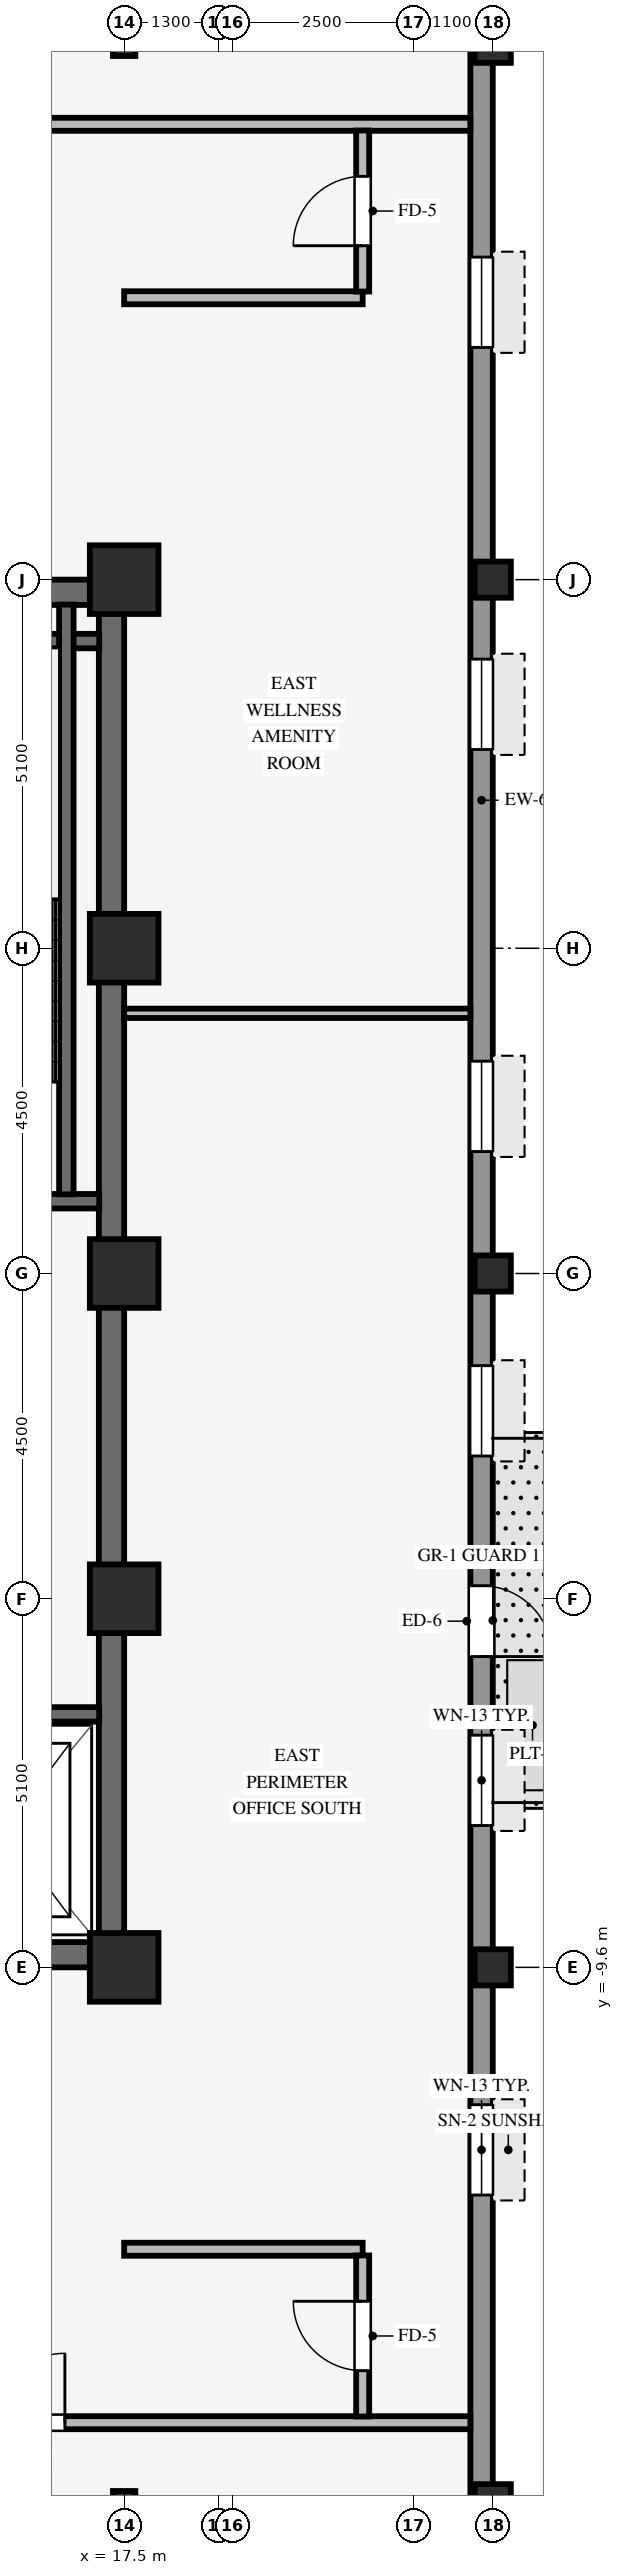
"""IFC4 building model, lengths in metres.
Left out: names, types, materials, properties, quantities, classifications, styles, units other than length and angle.
Written with IfcOpenShell. Run it as: python <this file> out.ifc"""

import sys

from ifc_helpers import new_model, si_unit, direction, frame, frame_2d, origin, origin_2d, place, context, subcontext, project, spatial, rectangle, hollow_rectangle, i_section, extrude, source, transform, mapped, element, fill, save


model = new_model("IFC4")
c1 = context("Model", 3, precision=1e-05, world=origin(), true_north=direction((0.0, 1.0)))
c2 = subcontext(c1, "Body", "Model", "MODEL_VIEW")
j1 = project(units=[si_unit("LENGTHUNIT", "METRE"), si_unit("PLANEANGLEUNIT", "RADIAN")], contexts=[c1])
p1 = place(None, origin())
s1 = spatial("IfcSite", under=j1, at=p1, CompositionType="ELEMENT")
p2 = place(p1, origin())
s2 = spatial("IfcBuilding", under=s1, at=p2, CompositionType="ELEMENT")
p3 = place(p2, frame((0.0, 0.0, 198.2)))
s3 = spatial("IfcBuildingStorey", under=s2, at=p3, CompositionType="ELEMENT", Elevation=198.2)
for number, where, z_axis, x_axis in (
    (1, (9.0, -9.425, 0.0), (0.0, 0.0, 1.0), (1.0, 0.0, 0.0)),
    (2, (9.0, 9.425, 0.0), (0.0, 0.0, 1.0), (1.0, 0.0, 0.0)),
):
    element("IfcWall", number, at=place(p3, frame(where, z_axis=z_axis, x_axis=x_axis)), inside=s3, PredefinedType="SHEAR", context=c2, shape_type="SweptSolid", body=[
        extrude(rectangle(XDim=8.5, YDim=0.35, at=frame_2d((4.25, 0.0))), origin(), (0.0, 0.0, 1.0), 3.37),
    ])
p4 = place(p3, frame((17.325, -9.255, 0.0), z_axis=(0.0, 0.0, 1.0), x_axis=(0.0, 1.0, 0.0)))
e3 = element("IfcWall", 3, at=p4, inside=s3, PredefinedType="SHEAR", context=c2, shape_type="SweptSolid", body=[
    extrude(rectangle(XDim=18.51, YDim=0.35, at=frame_2d((9.255, 0.0))), origin(), (0.0, 0.0, 1.0), 3.37),
])
for number, where, z_axis, x_axis in (
    (4, (17.5, -9.6, 0.0), (0.0, 0.0, 1.0), (1.0, 0.0, 0.0)),
    (5, (17.5, -4.5, 0.0), (0.0, 0.0, 1.0), (1.0, 0.0, 0.0)),
    (6, (17.5, 4.5, 0.0), (0.0, 0.0, 1.0), (1.0, 0.0, 0.0)),
    (7, (17.5, 9.6, 0.0), (0.0, 0.0, 1.0), (1.0, 0.0, 0.0)),
    (8, (17.5, 0.0, 0.0), (0.0, 0.0, 1.0), (1.0, 0.0, 0.0)),
):
    element("IfcColumn", number, at=place(p3, frame(where, z_axis=z_axis, x_axis=x_axis)), inside=s3, PredefinedType="COLUMN", context=c2, shape_type="SweptSolid", body=[
        extrude(rectangle(XDim=0.95, YDim=0.95, at=origin_2d()), origin(), (0.0, 0.0, 1.0), 3.37),
    ])
for number, where, z_axis, x_axis in (
    (9, (22.6, -17.0, 0.0), (0.0, 0.0, 1.0), (1.0, 0.0, 0.0)),
    (10, (22.6, -9.6, 0.0), (0.0, 0.0, 1.0), (1.0, 0.0, 0.0)),
    (11, (22.6, 0.0, 0.0), (0.0, 0.0, 1.0), (1.0, 0.0, 0.0)),
    (12, (22.6, 9.6, 0.0), (0.0, 0.0, 1.0), (1.0, 0.0, 0.0)),
    (13, (22.6, 17.0, 0.0), (0.0, 0.0, 1.0), (1.0, 0.0, 0.0)),
):
    element("IfcColumn", number, at=place(p3, frame(where, z_axis=z_axis, x_axis=x_axis)), inside=s3, PredefinedType="COLUMN", context=c2, shape_type="SweptSolid", body=[
        extrude(hollow_rectangle(XDim=0.5, YDim=0.5, WallThickness=0.032, InnerFilletRadius=0.032, OuterFilletRadius=0.064, at=origin_2d()), origin(), (0.0, 0.0, 1.0), 3.37),
    ])
for number, where, z_axis, x_axis in (
    (14, (17.5, -17.0, 0.0), (0.0, 0.0, 1.0), (1.0, 0.0, 0.0)),
    (15, (17.5, 17.0, 0.0), (0.0, 0.0, 1.0), (1.0, 0.0, 0.0)),
):
    element("IfcColumn", number, at=place(p3, frame(where, z_axis=z_axis, x_axis=x_axis)), inside=s3, PredefinedType="COLUMN", context=c2, shape_type="SweptSolid", body=[
        extrude(i_section(OverallWidth=0.31, OverallDepth=0.31, WebThickness=0.015, FlangeThickness=0.015, FilletRadius=0.015, at=origin_2d()), origin(), (0.0, 0.0, 1.0), 3.37),
    ])
p5 = place(p3, frame((22.445, -20.794, 0.0), z_axis=(0.0, 0.0, 1.0), x_axis=(0.0, 1.0, 0.0)))
e16 = element("IfcWall", 16, at=p5, inside=s3, PredefinedType="STANDARD", context=c2, shape_type="SweptSolid", body=[
    extrude(rectangle(XDim=37.788, YDim=0.31, at=frame_2d((18.894, 0.0))), origin(), (0.0, 0.0, 1.0), 2.705),
])
p6 = place(p5, frame((16.474, 0.0, 0.0), z_axis=(0.0, 0.0, 1.0), x_axis=(-1.0, 0.0, 0.0)))
e17 = element("IfcOpeningElement", 17, at=p6, cuts=e16, PredefinedType="OPENING", context=c2, shape_type="SweptSolid", body=[
    extrude(rectangle(XDim=0.98, YDim=2.15, at=frame_2d((0.49, 1.075))), frame((0.0, 0.165, 0.0), z_axis=(0.0, -1.0, 0.0), x_axis=(1.0, 0.0, 0.0)), (0.0, 0.0, 1.0), 0.33),
])
p7 = place(p5, frame((1.581, 0.0, 0.8)))
e18 = element("IfcOpeningElement", 18, at=p7, cuts=e16, PredefinedType="OPENING", context=c2, shape_type="SweptSolid", body=[
    extrude(rectangle(XDim=1.25, YDim=1.52, at=frame_2d((0.625, 0.76))), frame((0.0, 0.165, 0.0), z_axis=(0.0, -1.0, 0.0), x_axis=(1.0, 0.0, 0.0)), (0.0, 0.0, 1.0), 0.33),
])
p8 = place(p5, frame((8.044, 0.0, 0.8)))
e19 = element("IfcOpeningElement", 19, at=p8, cuts=e16, PredefinedType="OPENING", context=c2, shape_type="SweptSolid", body=[
    extrude(rectangle(XDim=1.25, YDim=1.52, at=frame_2d((0.625, 0.76))), frame((0.0, 0.165, 0.0), z_axis=(0.0, -1.0, 0.0), x_axis=(1.0, 0.0, 0.0)), (0.0, 0.0, 1.0), 0.33),
])
p9 = place(p5, frame((13.156, 0.0, 0.8)))
e20 = element("IfcOpeningElement", 20, at=p9, cuts=e16, PredefinedType="OPENING", context=c2, shape_type="SweptSolid", body=[
    extrude(rectangle(XDim=1.25, YDim=1.52, at=frame_2d((0.625, 0.76))), frame((0.0, 0.165, 0.0), z_axis=(0.0, -1.0, 0.0), x_axis=(1.0, 0.0, 0.0)), (0.0, 0.0, 1.0), 0.33),
])
p10 = place(p5, frame((18.269, 0.0, 0.8)))
e21 = element("IfcOpeningElement", 21, at=p10, cuts=e16, PredefinedType="OPENING", context=c2, shape_type="SweptSolid", body=[
    extrude(rectangle(XDim=1.25, YDim=1.52, at=frame_2d((0.625, 0.76))), frame((0.0, 0.165, 0.0), z_axis=(0.0, -1.0, 0.0), x_axis=(1.0, 0.0, 0.0)), (0.0, 0.0, 1.0), 0.33),
])
p11 = place(p5, frame((22.482, 0.0, 0.8)))
e22 = element("IfcOpeningElement", 22, at=p11, cuts=e16, PredefinedType="OPENING", context=c2, shape_type="SweptSolid", body=[
    extrude(rectangle(XDim=1.25, YDim=1.52, at=frame_2d((0.625, 0.76))), frame((0.0, 0.165, 0.0), z_axis=(0.0, -1.0, 0.0), x_axis=(1.0, 0.0, 0.0)), (0.0, 0.0, 1.0), 0.33),
])
p12 = place(p5, frame((28.044, 0.0, 0.8)))
e23 = element("IfcOpeningElement", 23, at=p12, cuts=e16, PredefinedType="OPENING", context=c2, shape_type="SweptSolid", body=[
    extrude(rectangle(XDim=1.25, YDim=1.52, at=frame_2d((0.625, 0.76))), frame((0.0, 0.165, 0.0), z_axis=(0.0, -1.0, 0.0), x_axis=(1.0, 0.0, 0.0)), (0.0, 0.0, 1.0), 0.33),
])
p13 = place(p5, frame((33.607, 0.0, 0.8)))
e24 = element("IfcOpeningElement", 24, at=p13, cuts=e16, PredefinedType="OPENING", context=c2, shape_type="SweptSolid", body=[
    extrude(rectangle(XDim=1.25, YDim=1.52, at=frame_2d((0.625, 0.76))), frame((0.0, 0.165, 0.0), z_axis=(0.0, -1.0, 0.0), x_axis=(1.0, 0.0, 0.0)), (0.0, 0.0, 1.0), 0.33),
])
for number, where, z_axis, x_axis in (
    (25, (13.535, 1.0, 0.0), (0.0, 0.0, 1.0), (1.0, 0.0, 0.0)),
    (26, (13.535, 8.75, 0.0), (0.0, 0.0, 1.0), (1.0, 0.0, 0.0)),
):
    element("IfcWall", number, at=place(p3, frame(where, z_axis=z_axis, x_axis=x_axis)), inside=s3, PredefinedType="SHEAR", context=c2, shape_type="SweptSolid", body=[
        extrude(rectangle(XDim=3.62, YDim=0.2, at=frame_2d((1.81, 0.0))), origin(), (0.0, 0.0, 1.0), 3.37),
    ])
p14 = place(p3, frame((16.7, 1.095, 0.0), z_axis=(0.0, 0.0, 1.0), x_axis=(0.0, 1.0, 0.0)))
e27 = element("IfcWall", 27, at=p14, inside=s3, PredefinedType="SHEAR", context=c2, shape_type="SweptSolid", body=[
    extrude(rectangle(XDim=8.16, YDim=0.2, at=frame_2d((4.08, 0.0))), origin(), (0.0, 0.0, 1.0), 3.37),
])
p15 = place(p3, frame((14.645, -6.1, 0.0), z_axis=(0.0, 0.0, 1.0), x_axis=(1.0, 0.0, 0.0)))
e28 = element("IfcWall", 28, at=p15, inside=s3, PredefinedType="SHEAR", context=c2, shape_type="SweptSolid", body=[
    extrude(rectangle(XDim=2.51, YDim=0.2, at=frame_2d((1.255, 0.0))), origin(), (0.0, 0.0, 1.0), 3.37),
])
p16 = place(p3, frame((-26.09, -15.9, 0.0), z_axis=(0.0, 0.0, 1.0), x_axis=(1.0, 0.0, 0.0)))
e29 = element("IfcWall", 29, at=p16, inside=s3, PredefinedType="PARTITIONING", context=c2, shape_type="SweptSolid", body=[
    extrude(rectangle(XDim=48.38, YDim=0.18, at=frame_2d((24.19, 0.0))), origin(), (0.0, 0.0, 1.0), 3.36),
])
p17 = place(p16, frame((41.81, 0.0, 0.0)))
e30 = element("IfcOpeningElement", 30, at=p17, cuts=e29, PredefinedType="OPENING", context=c2, shape_type="SweptSolid", body=[
    extrude(rectangle(XDim=0.96, YDim=2.1, at=frame_2d((0.48, 1.05))), frame((0.0, 0.1, 0.0), z_axis=(0.0, -1.0, 0.0), x_axis=(1.0, 0.0, 0.0)), (0.0, 0.0, 1.0), 0.2),
])
p18 = place(p16, frame((17.985, 0.0, 0.0)))
e31 = element("IfcOpeningElement", 31, at=p18, cuts=e29, PredefinedType="OPENING", context=c2, shape_type="SweptSolid", body=[
    extrude(rectangle(XDim=0.96, YDim=2.1, at=frame_2d((0.48, 1.05))), frame((0.0, 0.1, 0.0), z_axis=(0.0, -1.0, 0.0), x_axis=(1.0, 0.0, 0.0)), (0.0, 0.0, 1.0), 0.2),
])
p19 = place(p16, frame((26.55, 0.0, 0.0)))
e32 = element("IfcOpeningElement", 32, at=p19, cuts=e29, PredefinedType="OPENING", context=c2, shape_type="SweptSolid", body=[
    extrude(rectangle(XDim=0.96, YDim=2.1, at=frame_2d((0.48, 1.05))), frame((0.0, 0.1, 0.0), z_axis=(0.0, -1.0, 0.0), x_axis=(1.0, 0.0, 0.0)), (0.0, 0.0, 1.0), 0.2),
])
p20 = place(p16, frame((10.935, 0.0, 0.0)))
e33 = element("IfcOpeningElement", 33, at=p20, cuts=e29, PredefinedType="OPENING", context=c2, shape_type="SweptSolid", body=[
    extrude(rectangle(XDim=0.96, YDim=2.1, at=frame_2d((0.48, 1.05))), frame((0.0, 0.1, 0.0), z_axis=(0.0, -1.0, 0.0), x_axis=(1.0, 0.0, 0.0)), (0.0, 0.0, 1.0), 0.2),
])
p21 = place(p16, frame((35.91, 0.0, 0.0)))
e34 = element("IfcOpeningElement", 34, at=p21, cuts=e29, PredefinedType="OPENING", context=c2, shape_type="SweptSolid", body=[
    extrude(rectangle(XDim=0.96, YDim=2.1, at=frame_2d((0.48, 1.05))), frame((0.0, 0.1, 0.0), z_axis=(0.0, -1.0, 0.0), x_axis=(1.0, 0.0, 0.0)), (0.0, 0.0, 1.0), 0.2),
])
p22 = place(p16, frame((2.465, 0.0, 0.0)))
e35 = element("IfcOpeningElement", 35, at=p22, cuts=e29, PredefinedType="OPENING", context=c2, shape_type="SweptSolid", body=[
    extrude(rectangle(XDim=0.96, YDim=2.1, at=frame_2d((0.48, 1.05))), frame((0.0, 0.1, 0.0), z_axis=(0.0, -1.0, 0.0), x_axis=(1.0, 0.0, 0.0)), (0.0, 0.0, 1.0), 0.2),
])
p23 = place(p3, frame((17.5, -13.5, 0.0), z_axis=(0.0, 0.0, 1.0), x_axis=(1.0, 0.0, 0.0)))
e36 = element("IfcWall", 36, at=p23, inside=s3, PredefinedType="PARTITIONING", context=c2, shape_type="SweptSolid", body=[
    extrude(rectangle(XDim=3.3, YDim=0.18, at=frame_2d((1.65, 0.0))), origin(), (0.0, 0.0, 1.0), 3.008),
])
p24 = place(p3, frame((17.5, 3.6, 0.0), z_axis=(0.0, 0.0, 1.0), x_axis=(1.0, 0.0, 0.0)))
e37 = element("IfcWall", 37, at=p24, inside=s3, PredefinedType="PARTITIONING", context=c2, shape_type="SweptSolid", body=[
    extrude(rectangle(XDim=4.79, YDim=0.13, at=frame_2d((2.395, 0.0))), origin(), (0.0, 0.0, 1.0), 3.36),
])
p25 = place(p3, frame((17.5, 13.5, 0.0), z_axis=(0.0, 0.0, 1.0), x_axis=(1.0, 0.0, 0.0)))
e38 = element("IfcWall", 38, at=p25, inside=s3, PredefinedType="PARTITIONING", context=c2, shape_type="SweptSolid", body=[
    extrude(rectangle(XDim=3.3, YDim=0.18, at=frame_2d((1.65, 0.0))), origin(), (0.0, 0.0, 1.0), 3.008),
])
p26 = place(p3, frame((-26.09, 15.9, 0.0), z_axis=(0.0, 0.0, 1.0), x_axis=(1.0, 0.0, 0.0)))
e39 = element("IfcWall", 39, at=p26, inside=s3, PredefinedType="PARTITIONING", context=c2, shape_type="SweptSolid", body=[
    extrude(rectangle(XDim=48.38, YDim=0.18, at=frame_2d((24.19, 0.0))), origin(), (0.0, 0.0, 1.0), 3.36),
])
p27 = place(p26, frame((14.29, 0.0, 0.0)))
e40 = element("IfcOpeningElement", 40, at=p27, cuts=e39, PredefinedType="OPENING", context=c2, shape_type="SweptSolid", body=[
    extrude(rectangle(XDim=0.96, YDim=2.1, at=frame_2d((0.48, 1.05))), frame((0.0, 0.1, 0.0), z_axis=(0.0, -1.0, 0.0), x_axis=(1.0, 0.0, 0.0)), (0.0, 0.0, 1.0), 0.2),
])
p28 = place(p26, frame((40.51, 0.0, 0.0)))
e41 = element("IfcOpeningElement", 41, at=p28, cuts=e39, PredefinedType="OPENING", context=c2, shape_type="SweptSolid", body=[
    extrude(rectangle(XDim=0.96, YDim=2.1, at=frame_2d((0.48, 1.05))), frame((0.0, 0.1, 0.0), z_axis=(0.0, -1.0, 0.0), x_axis=(1.0, 0.0, 0.0)), (0.0, 0.0, 1.0), 0.2),
])
p29 = place(p3, frame((20.8, -15.814, 0.0), z_axis=(0.0, 0.0, 1.0), x_axis=(0.0, 1.0, 0.0)))
e42 = element("IfcWall", 42, at=p29, inside=s3, PredefinedType="PARTITIONING", context=c2, shape_type="SweptSolid", body=[
    extrude(rectangle(XDim=2.228, YDim=0.18, at=frame_2d((1.114, 0.0))), origin(), (0.0, 0.0, 1.0), 3.36),
])
p30 = place(p29, frame((0.634, 0.0, 0.0)))
e43 = element("IfcOpeningElement", 43, at=p30, cuts=e42, PredefinedType="OPENING", context=c2, shape_type="SweptSolid", body=[
    extrude(rectangle(XDim=0.96, YDim=2.1, at=frame_2d((0.48, 1.05))), frame((0.0, 0.1, 0.0), z_axis=(0.0, -1.0, 0.0), x_axis=(1.0, 0.0, 0.0)), (0.0, 0.0, 1.0), 0.2),
])
p31 = place(p3, frame((20.8, 13.586, 0.0), z_axis=(0.0, 0.0, 1.0), x_axis=(0.0, 1.0, 0.0)))
e44 = element("IfcWall", 44, at=p31, inside=s3, PredefinedType="PARTITIONING", context=c2, shape_type="SweptSolid", body=[
    extrude(rectangle(XDim=2.228, YDim=0.18, at=frame_2d((1.114, 0.0))), origin(), (0.0, 0.0, 1.0), 3.36),
])
p32 = place(p31, frame((0.634, 0.0, 0.0)))
e45 = element("IfcOpeningElement", 45, at=p32, cuts=e44, PredefinedType="OPENING", context=c2, shape_type="SweptSolid", body=[
    extrude(rectangle(XDim=0.96, YDim=2.1, at=frame_2d((0.48, 1.05))), frame((0.0, 0.1, 0.0), z_axis=(0.0, -1.0, 0.0), x_axis=(1.0, 0.0, 0.0)), (0.0, 0.0, 1.0), 0.2),
])
m1 = source(origin(), c2, "Body", "SweptSolid", [
    extrude(rectangle(XDim=0.98, YDim=2.15, at=frame_2d((0.49, 1.075))), frame((0.0, 0.025, 0.0), z_axis=(0.0, -1.0, 0.0), x_axis=(1.0, 0.0, 0.0)), (0.0, 0.0, 1.0), 0.05),
])
p33 = place(p6, origin())
e46 = element("IfcDoor", 46, at=p33, inside=s3, OperationType="SINGLE_SWING_RIGHT", PredefinedType="DOOR", context=c2, shape_type="MappedRepresentation", body=[
    mapped(m1, transform((0.0, 0.0, 0.0), scale=1.0)),
])
fill(e17, e46)
m2 = source(origin(), c2, "Body", "SweptSolid", [
    extrude(rectangle(XDim=1.25, YDim=1.52, at=frame_2d((0.625, 0.76))), frame((0.0, 0.03, 0.0), z_axis=(0.0, -1.0, 0.0), x_axis=(1.0, 0.0, 0.0)), (0.0, 0.0, 1.0), 0.06),
])
p34 = place(p8, origin())
e47 = element("IfcWindow", 47, at=p34, inside=s3, PartitioningType="SINGLE_PANEL", PredefinedType="WINDOW", context=c2, shape_type="MappedRepresentation", body=[
    mapped(m2, transform((0.0, 0.0, 0.0), scale=1.0)),
])
fill(e19, e47)
p35 = place(p9, origin())
e48 = element("IfcWindow", 48, at=p35, inside=s3, PartitioningType="SINGLE_PANEL", PredefinedType="WINDOW", context=c2, shape_type="MappedRepresentation", body=[
    mapped(m2, transform((0.0, 0.0, 0.0), scale=1.0)),
])
fill(e20, e48)
p36 = place(p10, origin())
e49 = element("IfcWindow", 49, at=p36, inside=s3, PartitioningType="SINGLE_PANEL", PredefinedType="WINDOW", context=c2, shape_type="MappedRepresentation", body=[
    mapped(m2, transform((0.0, 0.0, 0.0), scale=1.0)),
])
fill(e21, e49)
p37 = place(p11, origin())
e50 = element("IfcWindow", 50, at=p37, inside=s3, PartitioningType="SINGLE_PANEL", PredefinedType="WINDOW", context=c2, shape_type="MappedRepresentation", body=[
    mapped(m2, transform((0.0, 0.0, 0.0), scale=1.0)),
])
fill(e22, e50)
p38 = place(p12, origin())
e51 = element("IfcWindow", 51, at=p38, inside=s3, PartitioningType="SINGLE_PANEL", PredefinedType="WINDOW", context=c2, shape_type="MappedRepresentation", body=[
    mapped(m2, transform((0.0, 0.0, 0.0), scale=1.0)),
])
fill(e23, e51)
p39 = place(p13, origin())
e52 = element("IfcWindow", 52, at=p39, inside=s3, PartitioningType="SINGLE_PANEL", PredefinedType="WINDOW", context=c2, shape_type="MappedRepresentation", body=[
    mapped(m2, transform((0.0, 0.0, 0.0), scale=1.0)),
])
fill(e24, e52)
m3 = source(origin(), c2, "Body", "SweptSolid", [
    extrude(rectangle(XDim=0.96, YDim=2.1, at=frame_2d((0.48, 1.05))), frame((0.0, 0.025, 0.0), z_axis=(0.0, -1.0, 0.0), x_axis=(1.0, 0.0, 0.0)), (0.0, 0.0, 1.0), 0.05),
])
p40 = place(p17, origin())
e53 = element("IfcDoor", 53, at=p40, inside=s3, OperationType="SINGLE_SWING_RIGHT", PredefinedType="DOOR", context=c2, shape_type="MappedRepresentation", body=[
    mapped(m3, transform((0.0, 0.0, 0.0), scale=1.0)),
])
fill(e30, e53)
p41 = place(p30, origin())
e54 = element("IfcDoor", 54, at=p41, inside=s3, OperationType="SINGLE_SWING_RIGHT", PredefinedType="DOOR", context=c2, shape_type="MappedRepresentation", body=[
    mapped(m3, transform((0.0, 0.0, 0.0), scale=1.0)),
])
fill(e43, e54)
p42 = place(p32, origin())
e55 = element("IfcDoor", 55, at=p42, inside=s3, OperationType="SINGLE_SWING_LEFT", PredefinedType="DOOR", context=c2, shape_type="MappedRepresentation", body=[
    mapped(m3, transform((0.0, 0.0, 0.0), scale=1.0)),
])
fill(e45, e55)
save(model, sys.argv[1])
